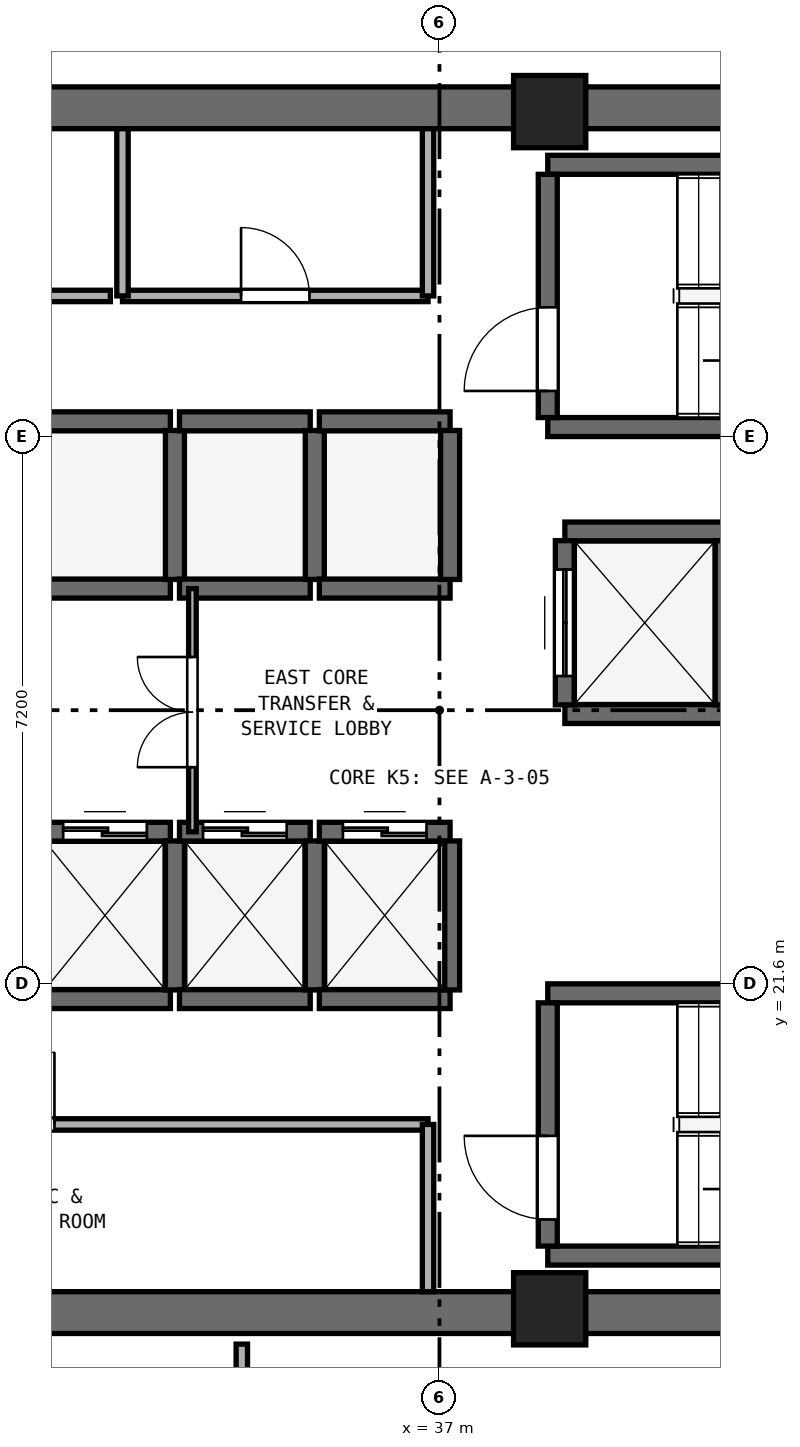
"""IFC4 building model, lengths in metres.
Left out: names, types, materials, properties, quantities, classifications, styles, units other than length and angle.
Written with IfcOpenShell. Run it as: python <this file> out.ifc"""

import sys

from ifc_helpers import new_model, si_unit, direction, frame, frame_2d, origin, origin_2d, place, context, subcontext, project, spatial, rectangle, extrude, element, fill, save


model = new_model("IFC4")
c1 = context("Model", 3, precision=1e-05, world=origin(), true_north=direction((0.0, 1.0)))
c2 = subcontext(c1, "Body", "Model", "MODEL_VIEW")
j1 = project(units=[si_unit("LENGTHUNIT", "METRE"), si_unit("PLANEANGLEUNIT", "RADIAN")], contexts=[c1])
p1 = place(None, origin())
s1 = spatial("IfcSite", under=j1, at=p1, CompositionType="ELEMENT")
p2 = place(p1, origin())
s2 = spatial("IfcBuilding", under=s1, at=p2, CompositionType="ELEMENT")
p3 = place(p2, frame((0.0, 0.0, 185.8)))
s3 = spatial("IfcBuildingStorey", under=s2, at=p3, CompositionType="ELEMENT", Elevation=185.8)
for number, where, z_axis, x_axis in (
    (1, (25.4, 17.275, 0.0), (0.0, 0.0, 1.0), (1.0, 0.0, 0.0)),
    (2, (25.4, 33.125, 0.0), (0.0, 0.0, 1.0), (1.0, 0.0, 0.0)),
):
    element("IfcWall", number, at=place(p3, frame(where, z_axis=z_axis, x_axis=x_axis)), inside=s3, PredefinedType="SHEAR", context=c2, shape_type="SweptSolid", body=[
        extrude(rectangle(XDim=23.2, YDim=0.55, at=frame_2d((11.6, 0.0))), origin(), (0.0, 0.0, 1.0), 3.54),
    ])
for number, where, z_axis, x_axis in (
    (3, (38.45, 17.325, 0.0), (0.0, 0.0, 1.0), (1.0, 0.0, 0.0)),
    (4, (38.45, 33.075, 0.0), (0.0, 0.0, 1.0), (1.0, 0.0, 0.0)),
):
    element("IfcColumn", number, at=place(p3, frame(where, z_axis=z_axis, x_axis=x_axis)), inside=s3, PredefinedType="PILASTER", context=c2, shape_type="SweptSolid", body=[
        extrude(rectangle(XDim=0.95, YDim=0.95, at=origin_2d()), origin(), (0.0, 0.0, 1.0), 3.8),
    ])
for number, where, z_axis, x_axis in (
    (5, (38.425, 28.925, 0.0), (0.0, 0.0, 1.0), (1.0, 0.0, 0.0)),
    (6, (38.425, 32.375, 0.0), (0.0, 0.0, 1.0), (1.0, 0.0, 0.0)),
):
    element("IfcWall", number, at=place(p3, frame(where, z_axis=z_axis, x_axis=x_axis)), inside=s3, PredefinedType="SHEAR", context=c2, shape_type="SweptSolid", body=[
        extrude(rectangle(XDim=7.3, YDim=0.25, at=frame_2d((3.65, 0.0))), origin(), (0.0, 0.0, 1.0), 3.54),
    ])
p4 = place(p3, frame((38.425, 29.05, 0.0), z_axis=(0.0, 0.0, 1.0), x_axis=(0.0, 1.0, 0.0)))
e7 = element("IfcWall", 7, at=p4, inside=s3, PredefinedType="SHEAR", context=c2, shape_type="SweptSolid", body=[
    extrude(rectangle(XDim=3.2, YDim=0.25, at=frame_2d((1.6, 0.0))), origin(), (0.0, 0.0, 1.0), 3.54),
])
p5 = place(p4, frame((0.35, 0.0, 0.0)))
e8 = element("IfcOpeningElement", 8, at=p5, cuts=e7, PredefinedType="OPENING", context=c2, shape_type="SweptSolid", body=[
    extrude(rectangle(XDim=1.1, YDim=2.15, at=frame_2d((0.55, 1.075))), frame((0.0, 0.135, 0.0), z_axis=(0.0, -1.0, 0.0), x_axis=(1.0, 0.0, 0.0)), (0.0, 0.0, 1.0), 0.27),
])
for number, where, z_axis, x_axis in (
    (9, (38.425, 18.025, 0.0), (0.0, 0.0, 1.0), (1.0, 0.0, 0.0)),
    (10, (38.425, 21.475, 0.0), (0.0, 0.0, 1.0), (1.0, 0.0, 0.0)),
):
    element("IfcWall", number, at=place(p3, frame(where, z_axis=z_axis, x_axis=x_axis)), inside=s3, PredefinedType="SHEAR", context=c2, shape_type="SweptSolid", body=[
        extrude(rectangle(XDim=7.3, YDim=0.25, at=frame_2d((3.65, 0.0))), origin(), (0.0, 0.0, 1.0), 3.54),
    ])
p6 = place(p3, frame((38.425, 18.15, 0.0), z_axis=(0.0, 0.0, 1.0), x_axis=(0.0, 1.0, 0.0)))
e11 = element("IfcWall", 11, at=p6, inside=s3, PredefinedType="SHEAR", context=c2, shape_type="SweptSolid", body=[
    extrude(rectangle(XDim=3.2, YDim=0.25, at=frame_2d((1.6, 0.0))), origin(), (0.0, 0.0, 1.0), 3.54),
])
p7 = place(p6, frame((0.35, 0.0, 0.0)))
e12 = element("IfcOpeningElement", 12, at=p7, cuts=e11, PredefinedType="OPENING", context=c2, shape_type="SweptSolid", body=[
    extrude(rectangle(XDim=1.1, YDim=2.15, at=frame_2d((0.55, 1.075))), frame((0.0, 0.135, 0.0), z_axis=(0.0, -1.0, 0.0), x_axis=(1.0, 0.0, 0.0)), (0.0, 0.0, 1.0), 0.27),
])
p8 = place(p3, frame((31.74, 21.4, 0.0), z_axis=(0.0, 0.0, 1.0), x_axis=(1.0, 0.0, 0.0)))
e13 = element("IfcWall", 13, at=p8, inside=s3, PredefinedType="SHEAR", context=c2, shape_type="SweptSolid", body=[
    extrude(rectangle(XDim=1.72, YDim=0.25, at=frame_2d((0.86, 0.0))), origin(), (0.0, 0.0, 1.0), 3.54),
])
p9 = place(p3, frame((31.74, 23.6, 0.0), z_axis=(0.0, 0.0, 1.0), x_axis=(1.0, 0.0, 0.0)))
e14 = element("IfcWall", 14, at=p9, inside=s3, PredefinedType="SHEAR", context=c2, shape_type="SweptSolid", body=[
    extrude(rectangle(XDim=1.72, YDim=0.25, at=frame_2d((0.86, 0.0))), origin(), (0.0, 0.0, 1.0), 3.54),
])
p10 = place(p9, frame((0.31, 0.0, 0.0)))
e15 = element("IfcOpeningElement", 15, at=p10, cuts=e14, PredefinedType="OPENING", context=c2, shape_type="SweptSolid", body=[
    extrude(rectangle(XDim=1.1, YDim=2.15, at=frame_2d((0.55, 1.075))), frame((0.0, 0.135, 0.0), z_axis=(0.0, -1.0, 0.0), x_axis=(1.0, 0.0, 0.0)), (0.0, 0.0, 1.0), 0.27),
])
p11 = place(p3, frame((33.52, 21.52, 0.0), z_axis=(0.0, 0.0, 1.0), x_axis=(0.0, 1.0, 0.0)))
e16 = element("IfcWall", 16, at=p11, inside=s3, PredefinedType="SHEAR", context=c2, shape_type="SweptSolid", body=[
    extrude(rectangle(XDim=1.96, YDim=0.25, at=frame_2d((0.98, 0.0))), origin(), (0.0, 0.0, 1.0), 3.54),
])
p12 = place(p3, frame((33.58, 21.4, 0.0), z_axis=(0.0, 0.0, 1.0), x_axis=(1.0, 0.0, 0.0)))
e17 = element("IfcWall", 17, at=p12, inside=s3, PredefinedType="SHEAR", context=c2, shape_type="SweptSolid", body=[
    extrude(rectangle(XDim=1.72, YDim=0.25, at=frame_2d((0.86, 0.0))), origin(), (0.0, 0.0, 1.0), 3.54),
])
p13 = place(p3, frame((33.58, 23.6, 0.0), z_axis=(0.0, 0.0, 1.0), x_axis=(1.0, 0.0, 0.0)))
e18 = element("IfcWall", 18, at=p13, inside=s3, PredefinedType="SHEAR", context=c2, shape_type="SweptSolid", body=[
    extrude(rectangle(XDim=1.72, YDim=0.25, at=frame_2d((0.86, 0.0))), origin(), (0.0, 0.0, 1.0), 3.54),
])
p14 = place(p13, frame((0.31, 0.0, 0.0)))
e19 = element("IfcOpeningElement", 19, at=p14, cuts=e18, PredefinedType="OPENING", context=c2, shape_type="SweptSolid", body=[
    extrude(rectangle(XDim=1.1, YDim=2.15, at=frame_2d((0.55, 1.075))), frame((0.0, 0.135, 0.0), z_axis=(0.0, -1.0, 0.0), x_axis=(1.0, 0.0, 0.0)), (0.0, 0.0, 1.0), 0.27),
])
p15 = place(p3, frame((35.36, 21.52, 0.0), z_axis=(0.0, 0.0, 1.0), x_axis=(0.0, 1.0, 0.0)))
e20 = element("IfcWall", 20, at=p15, inside=s3, PredefinedType="SHEAR", context=c2, shape_type="SweptSolid", body=[
    extrude(rectangle(XDim=1.96, YDim=0.25, at=frame_2d((0.98, 0.0))), origin(), (0.0, 0.0, 1.0), 3.54),
])
p16 = place(p3, frame((35.42, 21.4, 0.0), z_axis=(0.0, 0.0, 1.0), x_axis=(1.0, 0.0, 0.0)))
e21 = element("IfcWall", 21, at=p16, inside=s3, PredefinedType="SHEAR", context=c2, shape_type="SweptSolid", body=[
    extrude(rectangle(XDim=1.72, YDim=0.25, at=frame_2d((0.86, 0.0))), origin(), (0.0, 0.0, 1.0), 3.54),
])
p17 = place(p3, frame((35.42, 23.6, 0.0), z_axis=(0.0, 0.0, 1.0), x_axis=(1.0, 0.0, 0.0)))
e22 = element("IfcWall", 22, at=p17, inside=s3, PredefinedType="SHEAR", context=c2, shape_type="SweptSolid", body=[
    extrude(rectangle(XDim=1.72, YDim=0.25, at=frame_2d((0.86, 0.0))), origin(), (0.0, 0.0, 1.0), 3.54),
])
p18 = place(p17, frame((0.31, 0.0, 0.0)))
e23 = element("IfcOpeningElement", 23, at=p18, cuts=e22, PredefinedType="OPENING", context=c2, shape_type="SweptSolid", body=[
    extrude(rectangle(XDim=1.1, YDim=2.15, at=frame_2d((0.55, 1.075))), frame((0.0, 0.135, 0.0), z_axis=(0.0, -1.0, 0.0), x_axis=(1.0, 0.0, 0.0)), (0.0, 0.0, 1.0), 0.27),
])
p19 = place(p3, frame((37.14, 21.52, 0.0), z_axis=(0.0, 0.0, 1.0), x_axis=(0.0, 1.0, 0.0)))
e24 = element("IfcWall", 24, at=p19, inside=s3, PredefinedType="SHEAR", context=c2, shape_type="SweptSolid", body=[
    extrude(rectangle(XDim=1.96, YDim=0.25, at=frame_2d((0.98, 0.0))), origin(), (0.0, 0.0, 1.0), 3.54),
])
for number, where, z_axis, x_axis in (
    (25, (31.74, 26.8, 0.0), (0.0, 0.0, 1.0), (1.0, 0.0, 0.0)),
    (26, (31.74, 29.0, 0.0), (0.0, 0.0, 1.0), (1.0, 0.0, 0.0)),
):
    element("IfcWall", number, at=place(p3, frame(where, z_axis=z_axis, x_axis=x_axis)), inside=s3, PredefinedType="SHEAR", context=c2, shape_type="SweptSolid", body=[
        extrude(rectangle(XDim=1.72, YDim=0.25, at=frame_2d((0.86, 0.0))), origin(), (0.0, 0.0, 1.0), 3.54),
    ])
p20 = place(p3, frame((33.52, 26.92, 0.0), z_axis=(0.0, 0.0, 1.0), x_axis=(0.0, 1.0, 0.0)))
e27 = element("IfcWall", 27, at=p20, inside=s3, PredefinedType="SHEAR", context=c2, shape_type="SweptSolid", body=[
    extrude(rectangle(XDim=1.96, YDim=0.25, at=frame_2d((0.98, 0.0))), origin(), (0.0, 0.0, 1.0), 3.54),
])
for number, where, z_axis, x_axis in (
    (28, (33.58, 26.8, 0.0), (0.0, 0.0, 1.0), (1.0, 0.0, 0.0)),
    (29, (33.58, 29.0, 0.0), (0.0, 0.0, 1.0), (1.0, 0.0, 0.0)),
):
    element("IfcWall", number, at=place(p3, frame(where, z_axis=z_axis, x_axis=x_axis)), inside=s3, PredefinedType="SHEAR", context=c2, shape_type="SweptSolid", body=[
        extrude(rectangle(XDim=1.72, YDim=0.25, at=frame_2d((0.86, 0.0))), origin(), (0.0, 0.0, 1.0), 3.54),
    ])
p21 = place(p3, frame((35.36, 26.92, 0.0), z_axis=(0.0, 0.0, 1.0), x_axis=(0.0, 1.0, 0.0)))
e30 = element("IfcWall", 30, at=p21, inside=s3, PredefinedType="SHEAR", context=c2, shape_type="SweptSolid", body=[
    extrude(rectangle(XDim=1.96, YDim=0.25, at=frame_2d((0.98, 0.0))), origin(), (0.0, 0.0, 1.0), 3.54),
])
for number, where, z_axis, x_axis in (
    (31, (35.42, 26.8, 0.0), (0.0, 0.0, 1.0), (1.0, 0.0, 0.0)),
    (32, (35.42, 29.0, 0.0), (0.0, 0.0, 1.0), (1.0, 0.0, 0.0)),
):
    element("IfcWall", number, at=place(p3, frame(where, z_axis=z_axis, x_axis=x_axis)), inside=s3, PredefinedType="SHEAR", context=c2, shape_type="SweptSolid", body=[
        extrude(rectangle(XDim=1.72, YDim=0.25, at=frame_2d((0.86, 0.0))), origin(), (0.0, 0.0, 1.0), 3.54),
    ])
p22 = place(p3, frame((37.14, 26.92, 0.0), z_axis=(0.0, 0.0, 1.0), x_axis=(0.0, 1.0, 0.0)))
e33 = element("IfcWall", 33, at=p22, inside=s3, PredefinedType="SHEAR", context=c2, shape_type="SweptSolid", body=[
    extrude(rectangle(XDim=1.96, YDim=0.25, at=frame_2d((0.98, 0.0))), origin(), (0.0, 0.0, 1.0), 3.54),
])
for number, where, z_axis, x_axis in (
    (34, (38.65, 25.15, 0.0), (0.0, 0.0, 1.0), (1.0, 0.0, 0.0)),
    (35, (38.65, 27.55, 0.0), (0.0, 0.0, 1.0), (1.0, 0.0, 0.0)),
):
    element("IfcWall", number, at=place(p3, frame(where, z_axis=z_axis, x_axis=x_axis)), inside=s3, PredefinedType="SHEAR", context=c2, shape_type="SweptSolid", body=[
        extrude(rectangle(XDim=2.1, YDim=0.25, at=frame_2d((1.05, 0.0))), origin(), (0.0, 0.0, 1.0), 3.54),
    ])
p23 = place(p3, frame((38.65, 25.27, 0.0), z_axis=(0.0, 0.0, 1.0), x_axis=(0.0, 1.0, 0.0)))
e36 = element("IfcWall", 36, at=p23, inside=s3, PredefinedType="SHEAR", context=c2, shape_type="SweptSolid", body=[
    extrude(rectangle(XDim=2.16, YDim=0.25, at=frame_2d((1.08, 0.0))), origin(), (0.0, 0.0, 1.0), 3.54),
])
p24 = place(p23, frame((0.38, 0.0, 0.0)))
e37 = element("IfcOpeningElement", 37, at=p24, cuts=e36, PredefinedType="OPENING", context=c2, shape_type="SweptSolid", body=[
    extrude(rectangle(XDim=1.4, YDim=2.2, at=frame_2d((0.7, 1.1))), frame((0.0, 0.135, 0.0), z_axis=(0.0, -1.0, 0.0), x_axis=(1.0, 0.0, 0.0)), (0.0, 0.0, 1.0), 0.27),
])
p25 = place(p3, frame((40.75, 25.27, 0.0), z_axis=(0.0, 0.0, 1.0), x_axis=(0.0, 1.0, 0.0)))
e38 = element("IfcWall", 38, at=p25, inside=s3, PredefinedType="SHEAR", context=c2, shape_type="SweptSolid", body=[
    extrude(rectangle(XDim=2.16, YDim=0.25, at=frame_2d((1.08, 0.0))), origin(), (0.0, 0.0, 1.0), 3.54),
])
p26 = place(p3, frame((29.43, 30.65, 0.0), z_axis=(0.0, 0.0, 1.0), x_axis=(1.0, 0.0, 0.0)))
e39 = element("IfcWall", 39, at=p26, inside=s3, PredefinedType="PARTITIONING", context=c2, shape_type="SweptSolid", body=[
    extrude(rectangle(XDim=3.24, YDim=0.15, at=frame_2d((1.62, 0.0))), origin(), (0.0, 0.0, 1.0), 3.54),
])
p27 = place(p26, frame((1.145, 0.0, 0.0)))
e40 = element("IfcOpeningElement", 40, at=p27, cuts=e39, PredefinedType="OPENING", context=c2, shape_type="SweptSolid", body=[
    extrude(rectangle(XDim=0.95, YDim=2.1, at=frame_2d((0.475, 1.05))), frame((0.0, 0.085, 0.0), z_axis=(0.0, -1.0, 0.0), x_axis=(1.0, 0.0, 0.0)), (0.0, 0.0, 1.0), 0.17),
])
p28 = place(p3, frame((32.83, 30.65, 0.0), z_axis=(0.0, 0.0, 1.0), x_axis=(1.0, 0.0, 0.0)))
e41 = element("IfcWall", 41, at=p28, inside=s3, PredefinedType="PARTITIONING", context=c2, shape_type="SweptSolid", body=[
    extrude(rectangle(XDim=4.02, YDim=0.15, at=frame_2d((2.01, 0.0))), origin(), (0.0, 0.0, 1.0), 3.54),
])
p29 = place(p28, frame((1.56, 0.0, 0.0)))
e42 = element("IfcOpeningElement", 42, at=p29, cuts=e41, PredefinedType="OPENING", context=c2, shape_type="SweptSolid", body=[
    extrude(rectangle(XDim=0.9, YDim=2.1, at=frame_2d((0.45, 1.05))), frame((0.0, 0.085, 0.0), z_axis=(0.0, -1.0, 0.0), x_axis=(1.0, 0.0, 0.0)), (0.0, 0.0, 1.0), 0.17),
])
for number, where, z_axis, x_axis in (
    (43, (32.83, 30.65, 0.0), (0.0, 0.0, 1.0), (0.0, 1.0, 0.0)),
    (44, (36.85, 30.65, 0.0), (0.0, 0.0, 1.0), (0.0, 1.0, 0.0)),
):
    element("IfcWall", number, at=place(p3, frame(where, z_axis=z_axis, x_axis=x_axis)), inside=s3, PredefinedType="PARTITIONING", context=c2, shape_type="SweptSolid", body=[
        extrude(rectangle(XDim=2.2, YDim=0.15, at=frame_2d((1.1, 0.0))), origin(), (0.0, 0.0, 1.0), 3.54),
    ])
p30 = place(p3, frame((26.07, 19.75, 0.0), z_axis=(0.0, 0.0, 1.0), x_axis=(1.0, 0.0, 0.0)))
e45 = element("IfcWall", 45, at=p30, inside=s3, PredefinedType="PARTITIONING", context=c2, shape_type="SweptSolid", body=[
    extrude(rectangle(XDim=10.78, YDim=0.15, at=frame_2d((5.39, 0.0))), origin(), (0.0, 0.0, 1.0), 3.54),
])
p31 = place(p30, frame((4.915, 0.0, 0.0)))
e46 = element("IfcOpeningElement", 46, at=p31, cuts=e45, PredefinedType="OPENING", context=c2, shape_type="SweptSolid", body=[
    extrude(rectangle(XDim=0.95, YDim=2.1, at=frame_2d((0.475, 1.05))), frame((0.0, 0.085, 0.0), z_axis=(0.0, -1.0, 0.0), x_axis=(1.0, 0.0, 0.0)), (0.0, 0.0, 1.0), 0.17),
])
p32 = place(p3, frame((36.85, 17.55, 0.0), z_axis=(0.0, 0.0, 1.0), x_axis=(0.0, 1.0, 0.0)))
e47 = element("IfcWall", 47, at=p32, inside=s3, PredefinedType="PARTITIONING", context=c2, shape_type="SweptSolid", body=[
    extrude(rectangle(XDim=2.2, YDim=0.15, at=frame_2d((1.1, 0.0))), origin(), (0.0, 0.0, 1.0), 3.54),
])
p33 = place(p3, frame((33.75, 23.6, 0.0), z_axis=(0.0, 0.0, 1.0), x_axis=(0.0, 1.0, 0.0)))
e48 = element("IfcWall", 48, at=p33, inside=s3, PredefinedType="PARTITIONING", context=c2, shape_type="SweptSolid", body=[
    extrude(rectangle(XDim=3.2, YDim=0.1, at=frame_2d((1.6, 0.0))), origin(), (0.0, 0.0, 1.0), 3.54),
])
p34 = place(p33, frame((0.85, 0.0, 0.0)))
e49 = element("IfcOpeningElement", 49, at=p34, cuts=e48, PredefinedType="OPENING", context=c2, shape_type="SweptSolid", body=[
    extrude(rectangle(XDim=1.45, YDim=2.12, at=frame_2d((0.725, 1.06))), frame((0.0, 0.06, 0.0), z_axis=(0.0, -1.0, 0.0), x_axis=(1.0, 0.0, 0.0)), (0.0, 0.0, 1.0), 0.12),
])
p35 = place(p3, frame((34.4, 14.85, 0.0), z_axis=(0.0, 0.0, 1.0), x_axis=(0.0, 1.0, 0.0)))
e50 = element("IfcWall", 50, at=p35, inside=s3, PredefinedType="PARTITIONING", context=c2, shape_type="SweptSolid", body=[
    extrude(rectangle(XDim=2.01, YDim=0.15, at=frame_2d((1.005, 0.0))), origin(), (0.0, 0.0, 1.0), 3.54),
])
p36 = place(p5, origin())
e51 = element("IfcDoor", 51, at=p36, inside=s3, OperationType="SINGLE_SWING_LEFT", PredefinedType="DOOR", context=c2, shape_type="SweptSolid", body=[
    extrude(rectangle(XDim=1.1, YDim=2.15, at=frame_2d((0.55, 1.075))), frame((0.0, 0.025, 0.0), z_axis=(0.0, -1.0, 0.0), x_axis=(1.0, 0.0, 0.0)), (0.0, 0.0, 1.0), 0.05),
])
fill(e8, e51)
p37 = place(p7, origin())
e52 = element("IfcDoor", 52, at=p37, inside=s3, OperationType="SINGLE_SWING_RIGHT", PredefinedType="DOOR", context=c2, shape_type="SweptSolid", body=[
    extrude(rectangle(XDim=1.1, YDim=2.15, at=frame_2d((0.55, 1.075))), frame((0.0, 0.025, 0.0), z_axis=(0.0, -1.0, 0.0), x_axis=(1.0, 0.0, 0.0)), (0.0, 0.0, 1.0), 0.05),
])
fill(e12, e52)
p38 = place(p10, origin())
e53 = element("IfcDoor", 53, at=p38, inside=s3, OperationType="DOUBLE_DOOR_SLIDING", PredefinedType="DOOR", context=c2, shape_type="SweptSolid", body=[
    extrude(rectangle(XDim=1.1, YDim=2.15, at=frame_2d((0.55, 1.075))), frame((0.0, 0.025, 0.0), z_axis=(0.0, -1.0, 0.0), x_axis=(1.0, 0.0, 0.0)), (0.0, 0.0, 1.0), 0.05),
])
fill(e15, e53)
p39 = place(p14, origin())
e54 = element("IfcDoor", 54, at=p39, inside=s3, OperationType="DOUBLE_DOOR_SLIDING", PredefinedType="DOOR", context=c2, shape_type="SweptSolid", body=[
    extrude(rectangle(XDim=1.1, YDim=2.15, at=frame_2d((0.55, 1.075))), frame((0.0, 0.025, 0.0), z_axis=(0.0, -1.0, 0.0), x_axis=(1.0, 0.0, 0.0)), (0.0, 0.0, 1.0), 0.05),
])
fill(e19, e54)
p40 = place(p18, origin())
e55 = element("IfcDoor", 55, at=p40, inside=s3, OperationType="DOUBLE_DOOR_SLIDING", PredefinedType="DOOR", context=c2, shape_type="SweptSolid", body=[
    extrude(rectangle(XDim=1.1, YDim=2.15, at=frame_2d((0.55, 1.075))), frame((0.0, 0.025, 0.0), z_axis=(0.0, -1.0, 0.0), x_axis=(1.0, 0.0, 0.0)), (0.0, 0.0, 1.0), 0.05),
])
fill(e23, e55)
p41 = place(p24, origin())
e56 = element("IfcDoor", 56, at=p41, inside=s3, OperationType="DOUBLE_DOOR_SLIDING", PredefinedType="DOOR", context=c2, shape_type="SweptSolid", body=[
    extrude(rectangle(XDim=1.4, YDim=2.2, at=frame_2d((0.7, 1.1))), frame((0.0, 0.025, 0.0), z_axis=(0.0, -1.0, 0.0), x_axis=(1.0, 0.0, 0.0)), (0.0, 0.0, 1.0), 0.05),
])
fill(e37, e56)
p42 = place(p29, origin())
e57 = element("IfcDoor", 57, at=p42, inside=s3, OperationType="SINGLE_SWING_LEFT", PredefinedType="DOOR", context=c2, shape_type="SweptSolid", body=[
    extrude(rectangle(XDim=0.9, YDim=2.1, at=frame_2d((0.45, 1.05))), frame((0.0, 0.025, 0.0), z_axis=(0.0, -1.0, 0.0), x_axis=(1.0, 0.0, 0.0)), (0.0, 0.0, 1.0), 0.05),
])
fill(e42, e57)
p43 = place(p31, origin())
e58 = element("IfcDoor", 58, at=p43, inside=s3, OperationType="SINGLE_SWING_RIGHT", PredefinedType="DOOR", context=c2, shape_type="SweptSolid", body=[
    extrude(rectangle(XDim=0.95, YDim=2.1, at=frame_2d((0.475, 1.05))), frame((0.0, 0.025, 0.0), z_axis=(0.0, -1.0, 0.0), x_axis=(1.0, 0.0, 0.0)), (0.0, 0.0, 1.0), 0.05),
])
fill(e46, e58)
p44 = place(p34, origin())
e59 = element("IfcDoor", 59, at=p44, inside=s3, OperationType="DOUBLE_DOOR_SINGLE_SWING", PredefinedType="DOOR", context=c2, shape_type="SweptSolid", body=[
    extrude(rectangle(XDim=1.45, YDim=2.12, at=frame_2d((0.725, 1.06))), frame((0.0, 0.025, 0.0), z_axis=(0.0, -1.0, 0.0), x_axis=(1.0, 0.0, 0.0)), (0.0, 0.0, 1.0), 0.05),
])
fill(e49, e59)
save(model, sys.argv[1])
